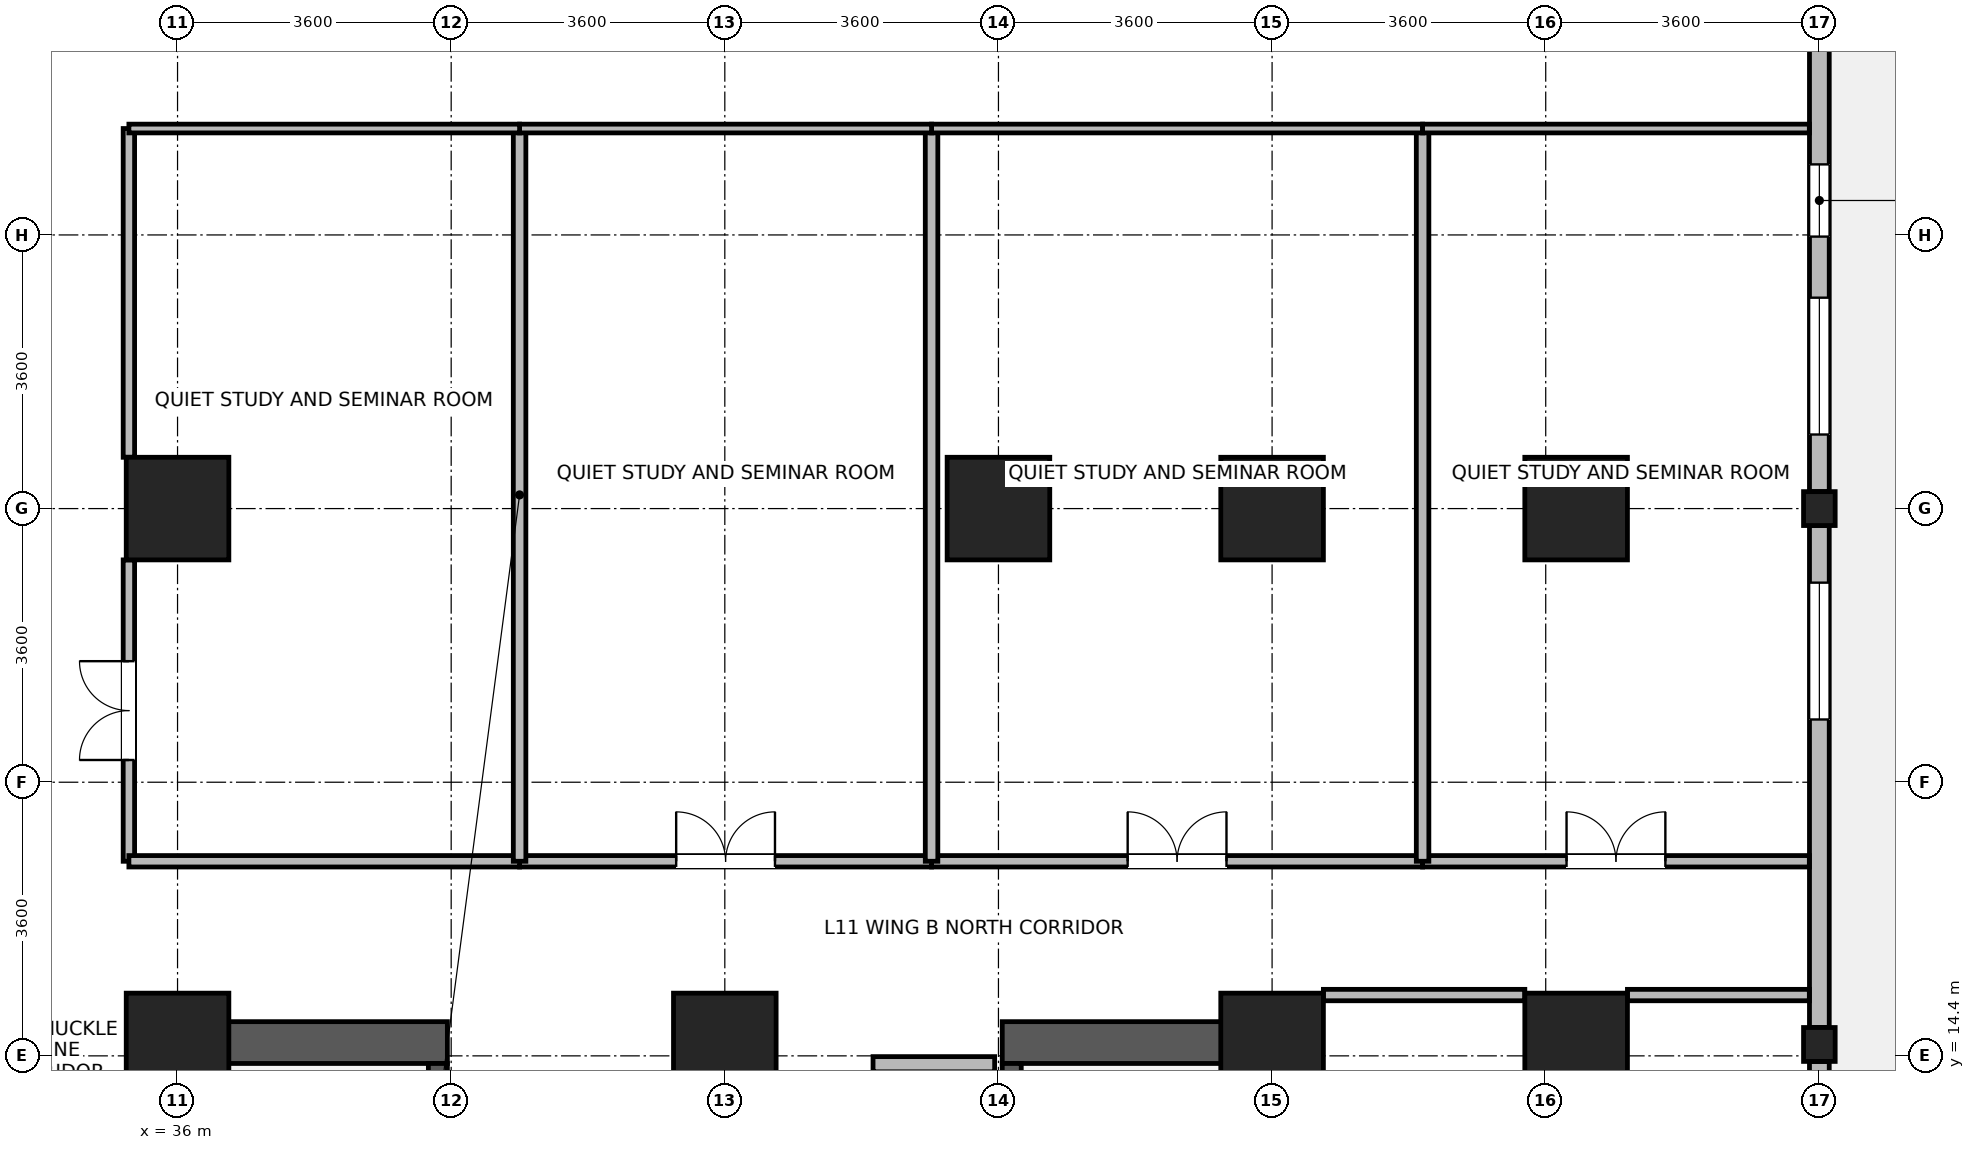
"""IFC4 building model, lengths in metres.
Left out: names, types, materials, properties, quantities, classifications, styles, units other than length and angle.
Written with IfcOpenShell. Run it as: python <this file> out.ifc"""

import sys

from ifc_helpers import new_model, si_unit, direction, frame, frame_2d, origin, origin_2d, place, context, subcontext, project, spatial, rectangle, i_section, extrude, source, transform, mapped, element, fill, save


model = new_model("IFC4")
c1 = context("Model", 3, precision=1e-05, world=origin(), true_north=direction((0.0, 1.0)))
c2 = subcontext(c1, "Body", "Model", "MODEL_VIEW")
j1 = project(units=[si_unit("LENGTHUNIT", "METRE"), si_unit("PLANEANGLEUNIT", "RADIAN")], contexts=[c1])
p1 = place(None, origin())
s1 = spatial("IfcSite", under=j1, at=p1, CompositionType="ELEMENT")
p2 = place(p1, origin())
s2 = spatial("IfcBuilding", under=s1, at=p2, CompositionType="ELEMENT")
p3 = place(p2, frame((0.0, 0.0, 47.5)))
s3 = spatial("IfcBuildingStorey", under=s2, at=p3, CompositionType="ELEMENT", Elevation=47.5)
for number, where, z_axis, x_axis in (
    (1, (36.075, 6.75, 0.0), (0.0, 0.0, 1.0), (0.0, 1.0, 0.0)),
    (2, (50.325, 6.75, 0.0), (0.0, 0.0, 1.0), (0.0, 1.0, 0.0)),
):
    element("IfcWall", number, at=place(p3, frame(where, z_axis=z_axis, x_axis=x_axis)), inside=s3, PredefinedType="SHEAR", context=c2, shape_type="SweptSolid", body=[
        extrude(rectangle(XDim=8.1, YDim=0.55, at=frame_2d((4.05, 0.0))), origin(), (0.0, 0.0, 1.0), 3.45),
    ])
for number, where, z_axis, x_axis in (
    (3, (36.35, 14.575, 0.0), (0.0, 0.0, 1.0), (1.0, 0.0, 0.0)),
    (4, (46.85, 14.575, 0.0), (0.0, 0.0, 1.0), (1.0, 0.0, 0.0)),
):
    element("IfcWall", number, at=place(p3, frame(where, z_axis=z_axis, x_axis=x_axis)), inside=s3, PredefinedType="SHEAR", context=c2, shape_type="SweptSolid", body=[
        extrude(rectangle(XDim=3.2, YDim=0.55, at=frame_2d((1.6, 0.0))), origin(), (0.0, 0.0, 1.0), 3.45),
    ])
p4 = place(p3, frame((39.425, 7.3, 0.0), z_axis=(0.0, 0.0, 1.0), x_axis=(0.0, 1.0, 0.0)))
e5 = element("IfcWall", 5, at=p4, inside=s3, PredefinedType="SHEAR", context=c2, shape_type="SweptSolid", body=[
    extrude(rectangle(XDim=7.0, YDim=0.25, at=frame_2d((3.5, 0.0))), origin(), (0.0, 0.0, 1.0), 3.45),
])
p5 = place(p4, frame((0.15, 0.0, 0.0)))
e6 = element("IfcOpeningElement", 6, at=p5, cuts=e5, PredefinedType="OPENING", context=c2, shape_type="SweptSolid", body=[
    extrude(rectangle(XDim=1.1, YDim=2.08, at=frame_2d((0.55, 1.04))), frame((0.0, 0.135, 0.0), z_axis=(0.0, -1.0, 0.0), x_axis=(1.0, 0.0, 0.0)), (0.0, 0.0, 1.0), 0.27),
])
p6 = place(p3, frame((46.975, 7.3, 0.0), z_axis=(0.0, 0.0, 1.0), x_axis=(0.0, 1.0, 0.0)))
e7 = element("IfcWall", 7, at=p6, inside=s3, PredefinedType="SHEAR", context=c2, shape_type="SweptSolid", body=[
    extrude(rectangle(XDim=7.0, YDim=0.25, at=frame_2d((3.5, 0.0))), origin(), (0.0, 0.0, 1.0), 3.45),
])
p7 = place(p6, frame((0.15, 0.0, 0.0)))
e8 = element("IfcOpeningElement", 8, at=p7, cuts=e7, PredefinedType="OPENING", context=c2, shape_type="SweptSolid", body=[
    extrude(rectangle(XDim=1.1, YDim=2.08, at=frame_2d((0.55, 1.04))), frame((0.0, 0.135, 0.0), z_axis=(0.0, -1.0, 0.0), x_axis=(1.0, 0.0, 0.0)), (0.0, 0.0, 1.0), 0.27),
])
m1 = source(origin(), c2, "Body", "SweptSolid", [
    extrude(rectangle(XDim=1.35, YDim=1.35, at=origin_2d()), origin(), (0.0, 0.0, 1.0), 3.7),
])
for number, where, z_axis, x_axis in (
    (9, (36.0, 21.6, 0.0), (0.0, 0.0, 1.0), (1.0, 0.0, 0.0)),
    (10, (46.8, 21.6, 0.0), (0.0, 0.0, 1.0), (1.0, 0.0, 0.0)),
    (11, (36.0, 14.55, 0.0), (0.0, 0.0, 1.0), (1.0, 0.0, 0.0)),
    (12, (43.2, 14.55, 0.0), (0.0, 0.0, 1.0), (1.0, 0.0, 0.0)),
    (13, (50.4, 14.55, 0.0), (0.0, 0.0, 1.0), (1.0, 0.0, 0.0)),
    (14, (50.4, 21.6, 0.0), (0.0, 0.0, 1.0), (1.0, 0.0, 0.0)),
    (15, (54.4, 14.55, 0.0), (0.0, 0.0, 1.0), (1.0, 0.0, 0.0)),
    (16, (54.4, 21.6, 0.0), (0.0, 0.0, 1.0), (1.0, 0.0, 0.0)),
):
    element("IfcColumn", number, at=place(p3, frame(where, z_axis=z_axis, x_axis=x_axis)), inside=s3, PredefinedType="COLUMN", context=c2, shape_type="MappedRepresentation", body=[
        mapped(m1, transform((0.0, 0.0, 0.0), x_axis=(1.0, 0.0, 0.0), y_axis=(0.0, 1.0, 0.0), z_axis=(0.0, 0.0, 1.0), scale=1.0)),
    ])
m2 = source(origin(), c2, "Body", "SweptSolid", [
    extrude(i_section(OverallWidth=0.416, OverallDepth=0.446, WebThickness=0.029, FlangeThickness=0.04, FilletRadius=0.015, at=origin_2d()), origin(), (0.0, 0.0, 1.0), 3.7),
])
for number, where, z_axis, x_axis in (
    (17, (57.6, 14.55, 0.0), (0.0, 0.0, 1.0), (1.0, 0.0, 0.0)),
    (18, (57.6, 21.6, 0.0), (0.0, 0.0, 1.0), (1.0, 0.0, 0.0)),
):
    element("IfcColumn", number, at=place(p3, frame(where, z_axis=z_axis, x_axis=x_axis)), inside=s3, PredefinedType="COLUMN", context=c2, shape_type="MappedRepresentation", body=[
        mapped(m2, transform((0.0, 0.0, 0.0), x_axis=(1.0, 0.0, 0.0), y_axis=(0.0, 1.0, 0.0), z_axis=(0.0, 0.0, 1.0), scale=1.0)),
    ])
p8 = place(p3, frame((57.6, 14.326, 0.0), z_axis=(0.0, 0.0, 1.0), x_axis=(0.0, -1.0, 0.0)))
e19 = element("IfcWall", 19, at=p8, inside=s3, PredefinedType="STANDARD", context=c2, shape_type="SweptSolid", body=[
    extrude(rectangle(XDim=7.052, YDim=0.26, at=frame_2d((3.526, 0.0))), origin(), (0.0, 0.0, 1.0), 2.93),
])
p9 = place(p8, frame((0.863, 0.0, 0.85)))
e20 = element("IfcOpeningElement", 20, at=p9, cuts=e19, PredefinedType="OPENING", context=c2, shape_type="SweptSolid", body=[
    extrude(rectangle(XDim=1.8, YDim=1.85, at=frame_2d((0.9, 0.925))), frame((0.0, 0.14, 0.0), z_axis=(0.0, -1.0, 0.0), x_axis=(1.0, 0.0, 0.0)), (0.0, 0.0, 1.0), 0.28),
])
p10 = place(p8, frame((4.389, 0.0, 0.85)))
e21 = element("IfcOpeningElement", 21, at=p10, cuts=e19, PredefinedType="OPENING", context=c2, shape_type="SweptSolid", body=[
    extrude(rectangle(XDim=1.8, YDim=1.85, at=frame_2d((0.9, 0.925))), frame((0.0, 0.14, 0.0), z_axis=(0.0, -1.0, 0.0), x_axis=(1.0, 0.0, 0.0)), (0.0, 0.0, 1.0), 0.28),
])
p11 = place(p3, frame((57.6, 21.376, 0.0), z_axis=(0.0, 0.0, 1.0), x_axis=(0.0, -1.0, 0.0)))
e22 = element("IfcWall", 22, at=p11, inside=s3, PredefinedType="STANDARD", context=c2, shape_type="SweptSolid", body=[
    extrude(rectangle(XDim=6.602, YDim=0.26, at=frame_2d((3.301, 0.0))), origin(), (0.0, 0.0, 1.0), 2.93),
])
p12 = place(p11, frame((0.75, 0.0, 0.85)))
e23 = element("IfcOpeningElement", 23, at=p12, cuts=e22, PredefinedType="OPENING", context=c2, shape_type="SweptSolid", body=[
    extrude(rectangle(XDim=1.8, YDim=1.85, at=frame_2d((0.9, 0.925))), frame((0.0, 0.14, 0.0), z_axis=(0.0, -1.0, 0.0), x_axis=(1.0, 0.0, 0.0)), (0.0, 0.0, 1.0), 0.28),
])
p13 = place(p3, frame((57.6, 28.426, 0.0), z_axis=(0.0, 0.0, 1.0), x_axis=(0.0, -1.0, 0.0)))
e24 = element("IfcWall", 24, at=p13, inside=s3, PredefinedType="STANDARD", context=c2, shape_type="SweptSolid", body=[
    extrude(rectangle(XDim=6.602, YDim=0.26, at=frame_2d((3.301, 0.0))), origin(), (0.0, 0.0, 1.0), 2.93),
])
p14 = place(p13, frame((4.052, 0.0, 0.85)))
e25 = element("IfcOpeningElement", 25, at=p14, cuts=e24, PredefinedType="OPENING", context=c2, shape_type="SweptSolid", body=[
    extrude(rectangle(XDim=1.8, YDim=1.85, at=frame_2d((0.9, 0.925))), frame((0.0, 0.14, 0.0), z_axis=(0.0, -1.0, 0.0), x_axis=(1.0, 0.0, 0.0)), (0.0, 0.0, 1.0), 0.28),
])
p15 = place(p13, frame((2.298, 0.0, 0.85)))
e26 = element("IfcOpeningElement", 26, at=p15, cuts=e24, PredefinedType="OPENING", context=c2, shape_type="SweptSolid", body=[
    extrude(rectangle(XDim=0.95, YDim=1.75, at=frame_2d((0.475, 0.875))), frame((0.0, 0.14, 0.0), z_axis=(0.0, -1.0, 0.0), x_axis=(1.0, 0.0, 0.0)), (0.0, 0.0, 1.0), 0.28),
])
p16 = place(p3, frame((45.15, 14.29, 0.0), z_axis=(0.0, 0.0, 1.0), x_axis=(1.0, 0.0, 0.0)))
e27 = element("IfcWall", 27, at=p16, inside=s3, PredefinedType="PARTITIONING", context=c2, shape_type="SweptSolid", body=[
    extrude(rectangle(XDim=1.6, YDim=0.2, at=frame_2d((0.8, 0.0))), origin(), (0.0, 0.0, 1.0), 2.23),
])
p17 = place(p3, frame((35.36, 16.96, 0.0), z_axis=(0.0, 0.0, 1.0), x_axis=(0.0, 1.0, 0.0)))
e28 = element("IfcWall", 28, at=p17, inside=s3, PredefinedType="PARTITIONING", context=c2, shape_type="SweptSolid", body=[
    extrude(rectangle(XDim=3.965, YDim=0.15, at=frame_2d((1.982, 0.0))), origin(), (0.0, 0.0, 1.0), 3.43),
])
p18 = place(p17, frame((1.333, 0.0, 0.0)))
e29 = element("IfcOpeningElement", 29, at=p18, cuts=e28, PredefinedType="OPENING", context=c2, shape_type="SweptSolid", body=[
    extrude(rectangle(XDim=1.3, YDim=2.12, at=frame_2d((0.65, 1.06))), frame((0.0, 0.085, 0.0), z_axis=(0.0, -1.0, 0.0), x_axis=(1.0, 0.0, 0.0)), (0.0, 0.0, 1.0), 0.17),
])
p19 = place(p3, frame((35.36, 22.275, 0.0), z_axis=(0.0, 0.0, 1.0), x_axis=(0.0, 1.0, 0.0)))
e30 = element("IfcWall", 30, at=p19, inside=s3, PredefinedType="PARTITIONING", context=c2, shape_type="SweptSolid", body=[
    extrude(rectangle(XDim=4.325, YDim=0.15, at=frame_2d((2.163, 0.0))), origin(), (0.0, 0.0, 1.0), 3.43),
])
p20 = place(p3, frame((51.075, 15.2, 0.0), z_axis=(0.0, 0.0, 1.0), x_axis=(1.0, 0.0, 0.0)))
e31 = element("IfcWall", 31, at=p20, inside=s3, PredefinedType="PARTITIONING", context=c2, shape_type="SweptSolid", body=[
    extrude(rectangle(XDim=2.65, YDim=0.15, at=frame_2d((1.325, 0.0))), origin(), (0.0, 0.0, 1.0), 3.43),
])
p21 = place(p3, frame((55.075, 15.2, 0.0), z_axis=(0.0, 0.0, 1.0), x_axis=(1.0, 0.0, 0.0)))
e32 = element("IfcWall", 32, at=p21, inside=s3, PredefinedType="PARTITIONING", context=c2, shape_type="SweptSolid", body=[
    extrude(rectangle(XDim=2.393, YDim=0.15, at=frame_2d((1.197, 0.0))), origin(), (0.0, 0.0, 1.0), 3.43),
])
p22 = place(p3, frame((45.92, 16.96, 0.0), z_axis=(0.0, 0.0, 1.0), x_axis=(1.0, 0.0, 0.0)))
e33 = element("IfcWall", 33, at=p22, inside=s3, PredefinedType="PARTITIONING", context=c2, shape_type="SweptSolid", body=[
    extrude(rectangle(XDim=6.46, YDim=0.15, at=frame_2d((3.23, 0.0))), origin(), (0.0, 0.0, 1.0), 3.43),
])
p23 = place(p22, frame((2.58, 0.0, 0.0)))
e34 = element("IfcOpeningElement", 34, at=p23, cuts=e33, PredefinedType="OPENING", context=c2, shape_type="SweptSolid", body=[
    extrude(rectangle(XDim=1.3, YDim=2.12, at=frame_2d((0.65, 1.06))), frame((0.0, 0.085, 0.0), z_axis=(0.0, -1.0, 0.0), x_axis=(1.0, 0.0, 0.0)), (0.0, 0.0, 1.0), 0.17),
])
p24 = place(p3, frame((40.5, 16.96, 0.0), z_axis=(0.0, 0.0, 1.0), x_axis=(1.0, 0.0, 0.0)))
e35 = element("IfcWall", 35, at=p24, inside=s3, PredefinedType="PARTITIONING", context=c2, shape_type="SweptSolid", body=[
    extrude(rectangle(XDim=5.42, YDim=0.15, at=frame_2d((2.71, 0.0))), origin(), (0.0, 0.0, 1.0), 3.43),
])
p25 = place(p24, frame((2.06, 0.0, 0.0)))
e36 = element("IfcOpeningElement", 36, at=p25, cuts=e35, PredefinedType="OPENING", context=c2, shape_type="SweptSolid", body=[
    extrude(rectangle(XDim=1.3, YDim=2.12, at=frame_2d((0.65, 1.06))), frame((0.0, 0.085, 0.0), z_axis=(0.0, -1.0, 0.0), x_axis=(1.0, 0.0, 0.0)), (0.0, 0.0, 1.0), 0.17),
])
p26 = place(p3, frame((52.38, 16.96, 0.0), z_axis=(0.0, 0.0, 1.0), x_axis=(1.0, 0.0, 0.0)))
e37 = element("IfcWall", 37, at=p26, inside=s3, PredefinedType="PARTITIONING", context=c2, shape_type="SweptSolid", body=[
    extrude(rectangle(XDim=5.088, YDim=0.15, at=frame_2d((2.544, 0.0))), origin(), (0.0, 0.0, 1.0), 3.43),
])
p27 = place(p26, frame((1.894, 0.0, 0.0)))
e38 = element("IfcOpeningElement", 38, at=p27, cuts=e37, PredefinedType="OPENING", context=c2, shape_type="SweptSolid", body=[
    extrude(rectangle(XDim=1.3, YDim=2.12, at=frame_2d((0.65, 1.06))), frame((0.0, 0.085, 0.0), z_axis=(0.0, -1.0, 0.0), x_axis=(1.0, 0.0, 0.0)), (0.0, 0.0, 1.0), 0.17),
])
p28 = place(p3, frame((35.36, 16.96, 0.0), z_axis=(0.0, 0.0, 1.0), x_axis=(1.0, 0.0, 0.0)))
e39 = element("IfcWall", 39, at=p28, inside=s3, PredefinedType="PARTITIONING", context=c2, shape_type="SweptSolid", body=[
    extrude(rectangle(XDim=5.14, YDim=0.15, at=frame_2d((2.57, 0.0))), origin(), (0.0, 0.0, 1.0), 3.43),
])
for number, where, z_axis, x_axis in (
    (40, (40.5, 16.96, 0.0), (0.0, 0.0, 1.0), (0.0, 1.0, 0.0)),
    (41, (45.92, 16.96, 0.0), (0.0, 0.0, 1.0), (0.0, 1.0, 0.0)),
    (42, (52.38, 16.96, 0.0), (0.0, 0.0, 1.0), (0.0, 1.0, 0.0)),
):
    element("IfcWall", number, at=place(p3, frame(where, z_axis=z_axis, x_axis=x_axis)), inside=s3, PredefinedType="PARTITIONING", context=c2, shape_type="SweptSolid", body=[
        extrude(rectangle(XDim=9.64, YDim=0.165, at=frame_2d((4.82, 0.0))), origin(), (0.0, 0.0, 1.0), 3.43),
    ])
p29 = place(p3, frame((45.92, 26.6, 0.0), z_axis=(0.0, 0.0, 1.0), x_axis=(1.0, 0.0, 0.0)))
e43 = element("IfcWall", 43, at=p29, inside=s3, PredefinedType="PARTITIONING", context=c2, shape_type="SweptSolid", body=[
    extrude(rectangle(XDim=6.46, YDim=0.115, at=frame_2d((3.23, 0.0))), origin(), (0.0, 0.0, 1.0), 3.43),
])
p30 = place(p3, frame((40.5, 26.6, 0.0), z_axis=(0.0, 0.0, 1.0), x_axis=(1.0, 0.0, 0.0)))
e44 = element("IfcWall", 44, at=p30, inside=s3, PredefinedType="PARTITIONING", context=c2, shape_type="SweptSolid", body=[
    extrude(rectangle(XDim=5.42, YDim=0.115, at=frame_2d((2.71, 0.0))), origin(), (0.0, 0.0, 1.0), 3.43),
])
p31 = place(p3, frame((52.38, 26.6, 0.0), z_axis=(0.0, 0.0, 1.0), x_axis=(1.0, 0.0, 0.0)))
e45 = element("IfcWall", 45, at=p31, inside=s3, PredefinedType="PARTITIONING", context=c2, shape_type="SweptSolid", body=[
    extrude(rectangle(XDim=5.088, YDim=0.115, at=frame_2d((2.544, 0.0))), origin(), (0.0, 0.0, 1.0), 3.43),
])
p32 = place(p3, frame((35.36, 26.6, 0.0), z_axis=(0.0, 0.0, 1.0), x_axis=(1.0, 0.0, 0.0)))
e46 = element("IfcWall", 46, at=p32, inside=s3, PredefinedType="PARTITIONING", context=c2, shape_type="SweptSolid", body=[
    extrude(rectangle(XDim=5.14, YDim=0.115, at=frame_2d((2.57, 0.0))), origin(), (0.0, 0.0, 1.0), 3.43),
])
p33 = place(p12, origin())
e47 = element("IfcWindow", 47, at=p33, inside=s3, PartitioningType="SINGLE_PANEL", PredefinedType="WINDOW", context=c2, shape_type="SweptSolid", body=[
    extrude(rectangle(XDim=1.8, YDim=1.85, at=frame_2d((0.9, 0.925))), frame((0.0, 0.03, 0.0), z_axis=(0.0, -1.0, 0.0), x_axis=(1.0, 0.0, 0.0)), (0.0, 0.0, 1.0), 0.06),
])
fill(e23, e47)
p34 = place(p14, origin())
e48 = element("IfcWindow", 48, at=p34, inside=s3, PartitioningType="SINGLE_PANEL", PredefinedType="WINDOW", context=c2, shape_type="SweptSolid", body=[
    extrude(rectangle(XDim=1.8, YDim=1.85, at=frame_2d((0.9, 0.925))), frame((0.0, 0.03, 0.0), z_axis=(0.0, -1.0, 0.0), x_axis=(1.0, 0.0, 0.0)), (0.0, 0.0, 1.0), 0.06),
])
fill(e25, e48)
p35 = place(p15, origin())
e49 = element("IfcWindow", 49, at=p35, inside=s3, PartitioningType="SINGLE_PANEL", PredefinedType="WINDOW", context=c2, shape_type="SweptSolid", body=[
    extrude(rectangle(XDim=0.95, YDim=1.75, at=frame_2d((0.475, 0.875))), frame((0.0, 0.03, 0.0), z_axis=(0.0, -1.0, 0.0), x_axis=(1.0, 0.0, 0.0)), (0.0, 0.0, 1.0), 0.06),
])
fill(e26, e49)
p36 = place(p18, origin())
e50 = element("IfcDoor", 50, at=p36, inside=s3, OperationType="DOUBLE_DOOR_SINGLE_SWING", PredefinedType="DOOR", context=c2, shape_type="SweptSolid", body=[
    extrude(rectangle(XDim=1.3, YDim=2.12, at=frame_2d((0.65, 1.06))), frame((0.0, 0.025, 0.0), z_axis=(0.0, -1.0, 0.0), x_axis=(1.0, 0.0, 0.0)), (0.0, 0.0, 1.0), 0.05),
])
fill(e29, e50)
p37 = place(p23, origin())
e51 = element("IfcDoor", 51, at=p37, inside=s3, OperationType="DOUBLE_DOOR_SINGLE_SWING", PredefinedType="DOOR", context=c2, shape_type="SweptSolid", body=[
    extrude(rectangle(XDim=1.3, YDim=2.12, at=frame_2d((0.65, 1.06))), frame((0.0, 0.025, 0.0), z_axis=(0.0, -1.0, 0.0), x_axis=(1.0, 0.0, 0.0)), (0.0, 0.0, 1.0), 0.05),
])
fill(e34, e51)
p38 = place(p25, origin())
e52 = element("IfcDoor", 52, at=p38, inside=s3, OperationType="DOUBLE_DOOR_SINGLE_SWING", PredefinedType="DOOR", context=c2, shape_type="SweptSolid", body=[
    extrude(rectangle(XDim=1.3, YDim=2.12, at=frame_2d((0.65, 1.06))), frame((0.0, 0.025, 0.0), z_axis=(0.0, -1.0, 0.0), x_axis=(1.0, 0.0, 0.0)), (0.0, 0.0, 1.0), 0.05),
])
fill(e36, e52)
p39 = place(p27, origin())
e53 = element("IfcDoor", 53, at=p39, inside=s3, OperationType="DOUBLE_DOOR_SINGLE_SWING", PredefinedType="DOOR", context=c2, shape_type="SweptSolid", body=[
    extrude(rectangle(XDim=1.3, YDim=2.12, at=frame_2d((0.65, 1.06))), frame((0.0, 0.025, 0.0), z_axis=(0.0, -1.0, 0.0), x_axis=(1.0, 0.0, 0.0)), (0.0, 0.0, 1.0), 0.05),
])
fill(e38, e53)
save(model, sys.argv[1])
